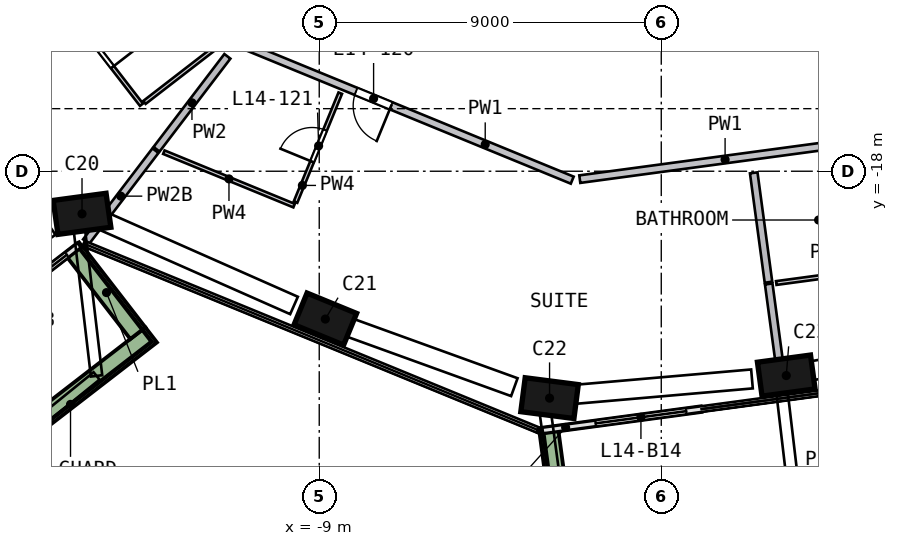
"""IFC4 building model, lengths in metres.
Left out: names, types, materials, properties, quantities, classifications, styles, units other than length and angle.
Written with IfcOpenShell. Run it as: python <this file> out.ifc"""

import sys

from ifc_helpers import new_model, si_unit, direction, frame, frame_2d, origin, origin_2d, place, context, subcontext, project, spatial, rectangle, extrude, element, fill, save


model = new_model("IFC4")
c1 = context("Model", 3, precision=1e-05, world=origin(), true_north=direction((0.0, 1.0)))
c2 = subcontext(c1, "Body", "Model", "MODEL_VIEW")
j1 = project(units=[si_unit("LENGTHUNIT", "METRE"), si_unit("PLANEANGLEUNIT", "RADIAN")], contexts=[c1])
p1 = place(None, origin())
s1 = spatial("IfcSite", under=j1, at=p1, CompositionType="ELEMENT")
p2 = place(p1, origin())
s2 = spatial("IfcBuilding", under=s1, at=p2, CompositionType="ELEMENT")
p3 = place(p2, frame((0.0, 0.0, 64.5)))
s3 = spatial("IfcBuildingStorey", under=s2, at=p3, CompositionType="ELEMENT", Elevation=64.5)
p4 = place(p3, frame((-15.352, -19.034, 0.0), z_axis=(0.091066973, -0.072215046, 0.993222932), x_axis=(-0.986912267, -0.139830688, 0.080321578)))
e1 = element("IfcColumn", 1, at=p4, inside=s3, PredefinedType="COLUMN", context=c2, shape_type="SweptSolid", body=[
    extrude(rectangle(XDim=1.4, YDim=0.9, at=origin_2d()), origin(), (0.0, 0.0, 1.0), 3.212),
])
p5 = place(p3, frame((-8.966, -21.84, 0.0), z_axis=(0.104264917, -0.041751597, 0.993672799), x_axis=(0.919295603, -0.377203026, -0.112309715)))
e2 = element("IfcColumn", 2, at=p5, inside=s3, PredefinedType="COLUMN", context=c2, shape_type="SweptSolid", body=[
    extrude(rectangle(XDim=1.4, YDim=0.9, at=origin_2d()), origin(), (0.0, 0.0, 1.0), 3.21),
])
p6 = place(p3, frame((-3.077, -23.954, 0.0), z_axis=(0.11404198, -0.013685038, 0.993381672), x_axis=(-0.985265789, 0.126725729, 0.114856063)))
e3 = element("IfcColumn", 3, at=p6, inside=s3, PredefinedType="COLUMN", context=c2, shape_type="SweptSolid", body=[
    extrude(rectangle(XDim=1.4, YDim=0.9, at=origin_2d()), origin(), (0.0, 0.0, 1.0), 3.211),
])
p7 = place(p3, frame((3.155, -23.396, 0.0), z_axis=(0.111185465, 0.015894502, 0.99367256), x_axis=(0.984830426, 0.132268988, -0.112311825)))
e4 = element("IfcColumn", 4, at=p7, inside=s3, PredefinedType="COLUMN", context=c2, shape_type="SweptSolid", body=[
    extrude(rectangle(XDim=1.4, YDim=0.9, at=origin_2d()), origin(), (0.0, 0.0, 1.0), 3.21),
])
p8 = place(p3, frame((-17.147, -21.362, 0.0), z_axis=(0.0, 0.0, 1.0), x_axis=(0.79146239, 0.61121787, 0.0)))
e5 = element("IfcWall", 5, at=p8, inside=s3, PredefinedType="SOLIDWALL", context=c2, shape_type="SweptSolid", body=[
    extrude(rectangle(XDim=2.3, YDim=0.15, at=frame_2d((1.15, 0.0))), origin(), (0.0, 0.0, 1.0), 2.425),
])
p9 = place(p8, frame((0.4, 0.0, 0.0)))
e6 = element("IfcOpeningElement", 6, at=p9, cuts=e5, PredefinedType="OPENING", context=c2, shape_type="SweptSolid", body=[
    extrude(rectangle(XDim=1.5, YDim=2.4, at=frame_2d((0.75, 1.2))), frame((0.0, 0.085, 0.0), z_axis=(0.0, -1.0, 0.0), x_axis=(1.0, 0.0, 0.0)), (0.0, 0.0, 1.0), 0.17),
])
p10 = place(p3, frame((-3.111, -24.822, 0.0), z_axis=(0.0, 0.0, 1.0), x_axis=(0.991025144, 0.133675593, 0.0)))
e7 = element("IfcWall", 7, at=p10, inside=s3, PredefinedType="SOLIDWALL", context=c2, shape_type="SweptSolid", body=[
    extrude(rectangle(XDim=4.199, YDim=0.15, at=frame_2d((2.099, 0.0))), origin(), (0.0, 0.0, 1.0), 2.425),
])
p11 = place(p10, frame((1.399, 0.0, 0.0)))
e8 = element("IfcOpeningElement", 8, at=p11, cuts=e7, PredefinedType="OPENING", context=c2, shape_type="SweptSolid", body=[
    extrude(rectangle(XDim=2.4, YDim=2.4, at=frame_2d((1.2, 1.2))), frame((0.0, 0.085, 0.0), z_axis=(0.0, -1.0, 0.0), x_axis=(1.0, 0.0, 0.0)), (0.0, 0.0, 1.0), 0.17),
])
p12 = place(p3, frame((-20.641, -27.882, 0.0), z_axis=(0.0, 0.0, 1.0), x_axis=(0.791440382, 0.611246367, 0.0)))
e9 = element("IfcWall", 9, at=p12, inside=s3, PredefinedType="SOLIDWALL", context=c2, shape_type="SweptSolid", body=[
    extrude(rectangle(XDim=9.121, YDim=0.5, at=frame_2d((4.561, 0.0))), origin(), (0.0, 0.0, 1.0), 0.7),
])
p13 = place(p3, frame((-13.773, -22.262, 0.0), z_axis=(0.0, 0.0, 1.0), x_axis=(-0.611300748, 0.791398379, 0.0)))
e10 = element("IfcWall", 10, at=p13, inside=s3, PredefinedType="SOLIDWALL", context=c2, shape_type="SweptSolid", body=[
    extrude(rectangle(XDim=2.699, YDim=0.5, at=frame_2d((1.35, 0.0))), origin(), (0.0, 0.0, 1.0), 0.7),
])
p14 = place(p3, frame((-2.952, -24.877, 0.0), z_axis=(0.0, 0.0, 1.0), x_axis=(0.133628231, -0.991031531, 0.0)))
e11 = element("IfcWall", 11, at=p14, inside=s3, PredefinedType="SOLIDWALL", context=c2, shape_type="SweptSolid", body=[
    extrude(rectangle(XDim=3.199, YDim=0.5, at=frame_2d((1.6, 0.0))), origin(), (0.0, 0.0, 1.0), 0.7),
])
p15 = place(p3, frame((-2.31, -27.766, 0.0), z_axis=(0.0, 0.0, 1.0), x_axis=(0.991030733, 0.133634153, 0.0)))
e12 = element("IfcWall", 12, at=p15, inside=s3, PredefinedType="SOLIDWALL", context=c2, shape_type="SweptSolid", body=[
    extrude(rectangle(XDim=13.223, YDim=0.5, at=frame_2d((6.612, 0.0))), origin(), (0.0, 0.0, 1.0), 0.7),
])
p16 = place(p3, frame((-27.486, -19.838, 0.0), z_axis=(0.0, 0.0, 1.0), x_axis=(0.791431192, 0.611258267, 0.0)))
e13 = element("IfcWall", 13, at=p16, inside=s3, PredefinedType="SOLIDWALL", context=c2, shape_type="SweptSolid", body=[
    extrude(rectangle(XDim=16.121, YDim=0.2, at=frame_2d((8.061, 0.0))), origin(), (0.0, 0.0, 1.0), 3.19),
])
p17 = place(p16, frame((10.16, 0.0, 0.0)))
e14 = element("IfcOpeningElement", 14, at=p17, cuts=e13, PredefinedType="OPENING", context=c2, shape_type="SweptSolid", body=[
    extrude(rectangle(XDim=1.0, YDim=2.1, at=frame_2d((0.5, 1.05))), frame((0.0, 0.11, 0.0), z_axis=(0.0, -1.0, 0.0), x_axis=(1.0, 0.0, 0.0)), (0.0, 0.0, 1.0), 0.22),
])
p18 = place(p3, frame((-13.541, -11.848, 0.0), z_axis=(0.0, 0.0, 1.0), x_axis=(-0.791435051, -0.611253271, 0.0)))
e15 = element("IfcWall", 15, at=p18, inside=s3, PredefinedType="SOLIDWALL", context=c2, shape_type="SweptSolid", body=[
    extrude(rectangle(XDim=15.921, YDim=0.2, at=frame_2d((7.96, 0.0))), origin(), (0.0, 0.0, 1.0), 3.19),
])
p19 = place(p18, frame((6.8, 0.0, 0.0)))
e16 = element("IfcOpeningElement", 16, at=p19, cuts=e15, PredefinedType="OPENING", context=c2, shape_type="SweptSolid", body=[
    extrude(rectangle(XDim=1.0, YDim=2.1, at=frame_2d((0.5, 1.05))), frame((0.0, 0.11, 0.0), z_axis=(0.0, -1.0, 0.0), x_axis=(1.0, 0.0, 0.0)), (0.0, 0.0, 1.0), 0.22),
])
p20 = place(p3, frame((-2.343, -18.235, 0.0), z_axis=(0.0, 0.0, 1.0), x_axis=(-0.925075034, 0.379784389, 0.0)))
e17 = element("IfcWall", 17, at=p20, inside=s3, PredefinedType="SOLIDWALL", context=c2, shape_type="SweptSolid", body=[
    extrude(rectangle(XDim=9.516, YDim=0.2, at=frame_2d((4.758, 0.0))), origin(), (0.0, 0.0, 1.0), 3.19),
])
p21 = place(p20, frame((5.15, 0.0, 0.0)))
e18 = element("IfcOpeningElement", 18, at=p21, cuts=e17, PredefinedType="OPENING", context=c2, shape_type="SweptSolid", body=[
    extrude(rectangle(XDim=1.0, YDim=2.1, at=frame_2d((0.5, 1.05))), frame((0.0, 0.11, 0.0), z_axis=(0.0, -1.0, 0.0), x_axis=(1.0, 0.0, 0.0)), (0.0, 0.0, 1.0), 0.22),
])
p22 = place(p3, frame((6.89, -16.99, 0.0), z_axis=(0.0, 0.0, 1.0), x_axis=(-0.991032924, -0.133617903, 0.0)))
e19 = element("IfcWall", 19, at=p22, inside=s3, PredefinedType="SOLIDWALL", context=c2, shape_type="SweptSolid", body=[
    extrude(rectangle(XDim=9.116, YDim=0.2, at=frame_2d((4.558, 0.0))), origin(), (0.0, 0.0, 1.0), 3.19),
])
p23 = place(p22, frame((0.2, 0.0, 0.0)))
e20 = element("IfcOpeningElement", 20, at=p23, cuts=e19, PredefinedType="OPENING", context=c2, shape_type="SweptSolid", body=[
    extrude(rectangle(XDim=1.0, YDim=2.1, at=frame_2d((0.5, 1.05))), frame((0.0, 0.11, 0.0), z_axis=(0.0, -1.0, 0.0), x_axis=(1.0, 0.0, 0.0)), (0.0, 0.0, 1.0), 0.22),
])
p24 = place(p3, frame((-13.309, -17.458, 0.0), z_axis=(0.0, 0.0, 1.0), x_axis=(-0.606272803, -0.795256743, 0.0)))
e21 = element("IfcWall", 21, at=p24, inside=s3, PredefinedType="SOLIDWALL", context=c2, shape_type="SweptSolid", body=[
    extrude(rectangle(XDim=3.011, YDim=0.2, at=frame_2d((1.506, 0.0))), origin(), (0.0, 0.0, 1.0), 2.69),
])
p25 = place(p3, frame((-11.417, -14.976, 0.0), z_axis=(0.0, 0.0, 1.0), x_axis=(-0.60623219, -0.795287704, 0.0)))
e22 = element("IfcWall", 22, at=p25, inside=s3, PredefinedType="SOLIDWALL", context=c2, shape_type="SweptSolid", body=[
    extrude(rectangle(XDim=3.075, YDim=0.2, at=frame_2d((1.537, 0.0))), origin(), (0.0, 0.0, 1.0), 3.19),
])
p26 = place(p3, frame((2.433, -18.042, 0.0), z_axis=(0.0, 0.0, 1.0), x_axis=(0.133639031, -0.991030075, 0.0)))
e23 = element("IfcWall", 23, at=p26, inside=s3, PredefinedType="SOLIDWALL", context=c2, shape_type="SweptSolid", body=[
    extrude(rectangle(XDim=2.905, YDim=0.2, at=frame_2d((1.452, 0.0))), origin(), (0.0, 0.0, 1.0), 3.19),
])
p27 = place(p3, frame((2.827, -20.967, 0.0), z_axis=(0.0, 0.0, 1.0), x_axis=(0.133566663, -0.991039831, 0.0)))
e24 = element("IfcWall", 24, at=p27, inside=s3, PredefinedType="SOLIDWALL", context=c2, shape_type="SweptSolid", body=[
    extrude(rectangle(XDim=2.952, YDim=0.2, at=frame_2d((1.476, 0.0))), origin(), (0.0, 0.0, 1.0), 3.19),
])
p28 = place(p3, frame((-15.634, -13.717, 0.0), z_axis=(0.0, 0.0, 1.0), x_axis=(0.61124338, -0.791442689, 0.0)))
e25 = element("IfcWall", 25, at=p28, inside=s3, PredefinedType="PARTITIONING", context=c2, shape_type="SweptSolid", body=[
    extrude(rectangle(XDim=3.2, YDim=0.1, at=frame_2d((1.6, 0.0))), origin(), (0.0, 0.0, 1.0), 3.19),
])
p29 = place(p28, frame((1.05, 0.0, 0.0)))
e26 = element("IfcOpeningElement", 26, at=p29, cuts=e25, PredefinedType="OPENING", context=c2, shape_type="SweptSolid", body=[
    extrude(rectangle(XDim=0.9, YDim=2.1, at=frame_2d((0.45, 1.05))), frame((0.0, 0.06, 0.0), z_axis=(0.0, -1.0, 0.0), x_axis=(1.0, 0.0, 0.0)), (0.0, 0.0, 1.0), 0.12),
])
p30 = place(p3, frame((-11.462, -14.539, 0.0), z_axis=(0.0, 0.0, 1.0), x_axis=(-0.79141226, -0.611282778, 0.0)))
e27 = element("IfcWall", 27, at=p30, inside=s3, PredefinedType="PARTITIONING", context=c2, shape_type="SweptSolid", body=[
    extrude(rectangle(XDim=2.7, YDim=0.1, at=frame_2d((1.35, 0.0))), origin(), (0.0, 0.0, 1.0), 3.19),
])
p31 = place(p3, frame((-9.662, -18.905, 0.0), z_axis=(0.0, 0.0, 1.0), x_axis=(-0.925065314, 0.379808062, 0.0)))
e28 = element("IfcWall", 28, at=p31, inside=s3, PredefinedType="PARTITIONING", context=c2, shape_type="SweptSolid", body=[
    extrude(rectangle(XDim=3.704, YDim=0.1, at=frame_2d((1.852, 0.0))), origin(), (0.0, 0.0, 1.0), 3.19),
])
p32 = place(p3, frame((-9.624, -18.813, 0.0), z_axis=(0.0, 0.0, 1.0), x_axis=(0.379767222, 0.925082081, 0.0)))
e29 = element("IfcWall", 29, at=p32, inside=s3, PredefinedType="PARTITIONING", context=c2, shape_type="SweptSolid", body=[
    extrude(rectangle(XDim=3.1, YDim=0.1, at=frame_2d((1.55, 0.0))), origin(), (0.0, 0.0, 1.0), 3.19),
])
p33 = place(p32, frame((1.15, 0.0, 0.0)))
e30 = element("IfcOpeningElement", 30, at=p33, cuts=e29, PredefinedType="OPENING", context=c2, shape_type="SweptSolid", body=[
    extrude(rectangle(XDim=0.9, YDim=2.1, at=frame_2d((0.45, 1.05))), frame((0.0, 0.06, 0.0), z_axis=(0.0, -1.0, 0.0), x_axis=(1.0, 0.0, 0.0)), (0.0, 0.0, 1.0), 0.12),
])
p34 = place(p3, frame((5.702, -20.581, 0.0), z_axis=(0.0, 0.0, 1.0), x_axis=(-0.991029366, -0.133644289, 0.0)))
e31 = element("IfcWall", 31, at=p34, inside=s3, PredefinedType="PARTITIONING", context=c2, shape_type="SweptSolid", body=[
    extrude(rectangle(XDim=2.7, YDim=0.1, at=frame_2d((1.35, 0.0))), origin(), (0.0, 0.0, 1.0), 3.19),
])
p35 = place(p9, origin())
e32 = element("IfcDoor", 32, at=p35, inside=s3, OperationType="SLIDING_TO_RIGHT", PredefinedType="DOOR", context=c2, shape_type="SweptSolid", body=[
    extrude(rectangle(XDim=1.5, YDim=2.4, at=frame_2d((0.75, 1.2))), frame((0.0, 0.025, 0.0), z_axis=(0.0, -1.0, 0.0), x_axis=(1.0, 0.0, 0.0)), (0.0, 0.0, 1.0), 0.05),
])
fill(e6, e32)
p36 = place(p11, origin())
e33 = element("IfcDoor", 33, at=p36, inside=s3, OperationType="SLIDING_TO_LEFT", PredefinedType="DOOR", context=c2, shape_type="SweptSolid", body=[
    extrude(rectangle(XDim=2.4, YDim=2.4, at=frame_2d((1.2, 1.2))), frame((0.0, 0.025, 0.0), z_axis=(0.0, -1.0, 0.0), x_axis=(1.0, 0.0, 0.0)), (0.0, 0.0, 1.0), 0.05),
])
fill(e8, e33)
p37 = place(p29, origin())
e34 = element("IfcDoor", 34, at=p37, inside=s3, OperationType="SINGLE_SWING_RIGHT", PredefinedType="DOOR", context=c2, shape_type="SweptSolid", body=[
    extrude(rectangle(XDim=0.9, YDim=2.1, at=frame_2d((0.45, 1.05))), frame((0.0, 0.025, 0.0), z_axis=(0.0, -1.0, 0.0), x_axis=(1.0, 0.0, 0.0)), (0.0, 0.0, 1.0), 0.05),
])
fill(e26, e34)
p38 = place(p21, origin())
e35 = element("IfcDoor", 35, at=p38, inside=s3, OperationType="SINGLE_SWING_LEFT", PredefinedType="DOOR", context=c2, shape_type="SweptSolid", body=[
    extrude(rectangle(XDim=1.0, YDim=2.1, at=frame_2d((0.5, 1.05))), frame((0.0, 0.025, 0.0), z_axis=(0.0, -1.0, 0.0), x_axis=(1.0, 0.0, 0.0)), (0.0, 0.0, 1.0), 0.05),
])
fill(e18, e35)
p39 = place(p33, origin())
e36 = element("IfcDoor", 36, at=p39, inside=s3, OperationType="SINGLE_SWING_LEFT", PredefinedType="DOOR", context=c2, shape_type="SweptSolid", body=[
    extrude(rectangle(XDim=0.9, YDim=2.1, at=frame_2d((0.45, 1.05))), frame((0.0, 0.025, 0.0), z_axis=(0.0, -1.0, 0.0), x_axis=(1.0, 0.0, 0.0)), (0.0, 0.0, 1.0), 0.05),
])
fill(e30, e36)
save(model, sys.argv[1])
